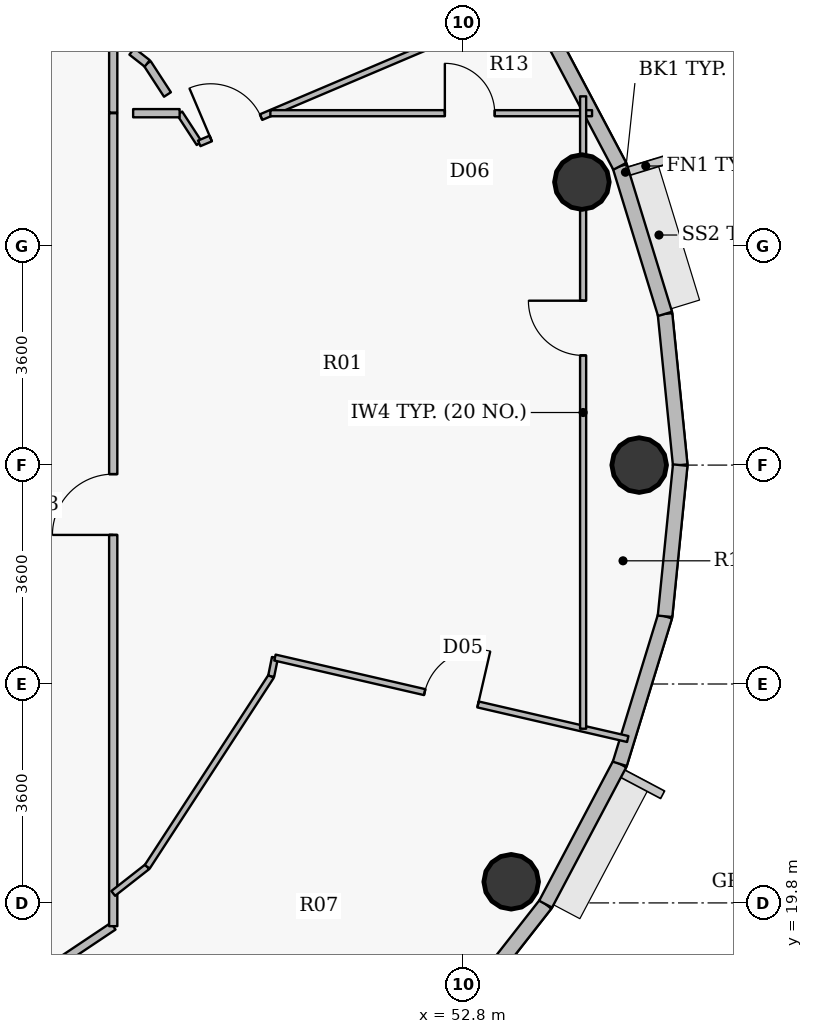
"""IFC4 building model, lengths in metres.
Left out: names, types, materials, properties, quantities, classifications, styles, units other than length and angle.
Written with IfcOpenShell. Run it as: python <this file> out.ifc"""

import sys

from ifc_helpers import new_model, si_unit, direction, frame, frame_2d, origin, origin_2d, place, context, subcontext, project, spatial, rectangle, hollow_circle, extrude, source, transform, mapped, element, fill, save


model = new_model("IFC4")
c1 = context("Model", 3, precision=1e-05, world=origin(), true_north=direction((0.0, 1.0)))
c2 = subcontext(c1, "Body", "Model", "MODEL_VIEW")
j1 = project(units=[si_unit("LENGTHUNIT", "METRE"), si_unit("PLANEANGLEUNIT", "RADIAN")], contexts=[c1])
p1 = place(None, origin())
s1 = spatial("IfcSite", under=j1, at=p1, CompositionType="ELEMENT")
p2 = place(p1, origin())
s2 = spatial("IfcBuilding", under=s1, at=p2, CompositionType="ELEMENT")
p3 = place(p2, frame((0.0, 0.0, 339.2)))
s3 = spatial("IfcBuildingStorey", under=s2, at=p3, CompositionType="ELEMENT", Elevation=339.2)
for number, where, z_axis, x_axis in (
    (1, (55.7, 27.0, 0.0), (0.0, 0.0, 1.0), (1.0, 0.0, 0.0)),
    (2, (54.758, 31.655, 0.0), (0.0, 0.0, 1.0), (1.0, 0.0, 0.0)),
    (3, (53.595, 20.147, 0.0), (0.0, 0.0, 1.0), (1.0, 0.0, 0.0)),
):
    element("IfcColumn", number, at=place(p3, frame(where, z_axis=z_axis, x_axis=x_axis)), inside=s3, PredefinedType="COLUMN", context=c2, shape_type="SweptSolid", body=[
        extrude(hollow_circle(Radius=0.45, WallThickness=0.028, at=origin_2d()), origin(), (0.0, 0.0, 1.0), 3.8),
    ])
p4 = place(p3, frame((56.125, 29.487, 0.0), z_axis=(0.0, 0.0, 1.0), x_axis=(0.100025963401, -0.994984827344, 0.0)))
e4 = element("IfcWall", 4, at=p4, inside=s3, PredefinedType="SOLIDWALL", context=c2, shape_type="SweptSolid", body=[
    extrude(rectangle(XDim=2.499, YDim=0.24, at=frame_2d((1.25, 0.0))), origin(), (0.0, 0.0, 1.0), 3.55),
])
p5 = place(p3, frame((55.381, 31.913, 0.0), z_axis=(0.0, 0.0, 1.0), x_axis=(0.293105547213, -0.956080089842, 0.0)))
e5 = element("IfcWall", 5, at=p5, inside=s3, PredefinedType="SOLIDWALL", context=c2, shape_type="SweptSolid", body=[
    extrude(rectangle(XDim=2.538, YDim=0.24, at=frame_2d((1.269, 0.0))), origin(), (0.0, 0.0, 1.0), 2.035),
])
p6 = place(p3, frame((54.161, 34.221, 0.0), z_axis=(0.0, 0.0, 1.0), x_axis=(0.467487999989, -0.883999417345, 0.0)))
e6 = element("IfcWall", 6, at=p6, inside=s3, PredefinedType="SOLIDWALL", context=c2, shape_type="SweptSolid", body=[
    extrude(rectangle(XDim=2.61, YDim=0.24, at=frame_2d((1.305, 0.0))), origin(), (0.0, 0.0, 1.0), 2.035),
])
p7 = place(p3, frame((54.161, 19.779, 0.0), z_axis=(0.0, 0.0, 1.0), x_axis=(-0.616286367698, -0.78752213492, 0.0)))
e7 = element("IfcWall", 7, at=p7, inside=s3, PredefinedType="SOLIDWALL", context=c2, shape_type="SweptSolid", body=[
    extrude(rectangle(XDim=2.706, YDim=0.24, at=frame_2d((1.353, 0.0))), origin(), (0.0, 0.0, 1.0), 2.035),
])
p8 = place(p3, frame((55.381, 22.087, 0.0), z_axis=(0.0, 0.0, 1.0), x_axis=(-0.467487999989, -0.883999417345, 0.0)))
e8 = element("IfcWall", 8, at=p8, inside=s3, PredefinedType="SOLIDWALL", context=c2, shape_type="SweptSolid", body=[
    extrude(rectangle(XDim=2.61, YDim=0.24, at=frame_2d((1.305, 0.0))), origin(), (0.0, 0.0, 1.0), 2.035),
])
p9 = place(p3, frame((56.125, 24.513, 0.0), z_axis=(0.0, 0.0, 1.0), x_axis=(-0.293105547213, -0.956080089842, 0.0)))
e9 = element("IfcWall", 9, at=p9, inside=s3, PredefinedType="SOLIDWALL", context=c2, shape_type="SweptSolid", body=[
    extrude(rectangle(XDim=2.538, YDim=0.24, at=frame_2d((1.269, 0.0))), origin(), (0.0, 0.0, 1.0), 3.55),
])
p10 = place(p3, frame((56.375, 27.0, 0.0), z_axis=(0.0, 0.0, 1.0), x_axis=(-0.100025963401, -0.994984827344, 0.0)))
e10 = element("IfcWall", 10, at=p10, inside=s3, PredefinedType="SOLIDWALL", context=c2, shape_type="SweptSolid", body=[
    extrude(rectangle(XDim=2.499, YDim=0.24, at=frame_2d((1.25, 0.0))), origin(), (0.0, 0.0, 1.0), 3.55),
])
p11 = place(p3, frame((45.541, 18.408, 0.0), z_axis=(0.0, 0.0, 1.0), x_axis=(0.831180227396, 0.556003084151, 0.0)))
e11 = element("IfcWall", 11, at=p11, inside=s3, PredefinedType="PARTITIONING", context=c2, shape_type="SweptSolid", body=[
    extrude(rectangle(XDim=1.815, YDim=0.135, at=frame_2d((0.908, 0.0))), origin(), (0.0, 0.0, 1.0), 3.085),
])
p12 = place(p3, frame((47.05, 19.417, 0.0), z_axis=(0.0, 0.0, 1.0), x_axis=(0.0, 1.0, 0.0)))
e12 = element("IfcWall", 12, at=p12, inside=s3, PredefinedType="PARTITIONING", context=c2, shape_type="SweptSolid", body=[
    extrude(rectangle(XDim=13.37, YDim=0.135, at=frame_2d((6.685, 0.0))), origin(), (0.0, 0.0, 1.0), 2.25),
])
p13 = place(p12, frame((6.434, 0.0, 0.0)))
e13 = element("IfcOpeningElement", 13, at=p13, cuts=e12, PredefinedType="OPENING", context=c2, shape_type="SweptSolid", body=[
    extrude(rectangle(XDim=1.0, YDim=2.15, at=origin_2d()), frame((0.5, 0.078, 1.075), z_axis=(0.0, -1.0, 0.0), x_axis=(1.0, 0.0, 0.0)), (0.0, 0.0, 1.0), 0.155),
])
p14 = place(p3, frame((47.05, 19.956, 0.0), z_axis=(0.0, 0.0, 1.0), x_axis=(0.787164110493, 0.616743595956, 0.0)))
e14 = element("IfcWall", 14, at=p14, inside=s3, PredefinedType="PARTITIONING", context=c2, shape_type="SweptSolid", body=[
    extrude(rectangle(XDim=0.71, YDim=0.1, at=frame_2d((0.355, 0.0))), origin(), (0.0, 0.0, 1.0), 2.25),
])
p15 = place(p3, frame((47.609, 20.394, 0.0), z_axis=(0.0, 0.0, 1.0), x_axis=(0.545364838352, 0.838198778983, 0.0)))
e15 = element("IfcWall", 15, at=p15, inside=s3, PredefinedType="PARTITIONING", context=c2, shape_type="SweptSolid", body=[
    extrude(rectangle(XDim=3.738, YDim=0.1, at=frame_2d((1.869, 0.0))), origin(), (0.0, 0.0, 1.0), 2.25),
])
p16 = place(p3, frame((48.142, 32.787, 0.0), z_axis=(0.0, 0.0, 1.0), x_axis=(0.545336289771, -0.838217353112, 0.0)))
e16 = element("IfcWall", 16, at=p16, inside=s3, PredefinedType="PARTITIONING", context=c2, shape_type="SweptSolid", body=[
    extrude(rectangle(XDim=0.592, YDim=0.1, at=frame_2d((0.296, 0.0))), origin(), (0.0, 0.0, 1.0), 3.55),
])
p17 = place(p3, frame((48.465, 32.291, 0.0), z_axis=(0.0, 0.0, 1.0), x_axis=(0.920507145492, 0.390725728739, 0.0)))
e17 = element("IfcWall", 17, at=p17, inside=s3, PredefinedType="PARTITIONING", context=c2, shape_type="SweptSolid", body=[
    extrude(rectangle(XDim=5.882, YDim=0.1, at=frame_2d((2.941, 0.0))), origin(), (0.0, 0.0, 1.0), 3.035),
])
p18 = place(p17, frame((0.205, 0.0, 0.0)))
e18 = element("IfcOpeningElement", 18, at=p18, cuts=e17, PredefinedType="OPENING", context=c2, shape_type="SweptSolid", body=[
    extrude(rectangle(XDim=0.9, YDim=2.1, at=origin_2d()), frame((0.45, 0.06, 1.05), z_axis=(0.0, -1.0, 0.0), x_axis=(1.0, 0.0, 0.0)), (0.0, 0.0, 1.0), 0.12),
])
p19 = place(p3, frame((49.634, 32.787, 0.0), z_axis=(0.0, 0.0, 1.0), x_axis=(1.0, 0.0, 0.0)))
e19 = element("IfcWall", 19, at=p19, inside=s3, PredefinedType="PARTITIONING", context=c2, shape_type="SweptSolid", body=[
    extrude(rectangle(XDim=5.291, YDim=0.1, at=frame_2d((2.645, 0.0))), origin(), (0.0, 0.0, 1.0), 3.035),
])
p20 = place(p19, frame((2.87, 0.0, 0.0)))
e20 = element("IfcOpeningElement", 20, at=p20, cuts=e19, PredefinedType="OPENING", context=c2, shape_type="SweptSolid", body=[
    extrude(rectangle(XDim=0.82, YDim=2.1, at=origin_2d()), frame((0.41, 0.06, 1.05), z_axis=(0.0, -1.0, 0.0), x_axis=(1.0, 0.0, 0.0)), (0.0, 0.0, 1.0), 0.12),
])
p21 = place(p3, frame((49.648, 23.527, 0.0), z_axis=(0.0, 0.0, 1.0), x_axis=(0.198359507495, 0.980129331153, 0.0)))
e21 = element("IfcWall", 21, at=p21, inside=s3, PredefinedType="PARTITIONING", context=c2, shape_type="SweptSolid", body=[
    extrude(rectangle(XDim=0.314, YDim=0.1, at=frame_2d((0.157, 0.0))), origin(), (0.0, 0.0, 1.0), 3.55),
])
p22 = place(p3, frame((49.71, 23.835, 0.0), z_axis=(0.0, 0.0, 1.0), x_axis=(0.974373225384, -0.224937363847, 0.0)))
e22 = element("IfcWall", 22, at=p22, inside=s3, PredefinedType="PARTITIONING", context=c2, shape_type="SweptSolid", body=[
    extrude(rectangle(XDim=5.954, YDim=0.1, at=frame_2d((2.977, 0.0))), origin(), (0.0, 0.0, 1.0), 3.035),
])
p23 = place(p22, frame((2.527, 0.0, 0.0)))
e23 = element("IfcOpeningElement", 23, at=p23, cuts=e22, PredefinedType="OPENING", context=c2, shape_type="SweptSolid", body=[
    extrude(rectangle(XDim=0.9, YDim=2.1, at=origin_2d()), frame((0.45, 0.06, 1.05), z_axis=(0.0, -1.0, 0.0), x_axis=(1.0, 0.0, 0.0)), (0.0, 0.0, 1.0), 0.12),
])
p24 = place(p3, frame((54.778, 22.665, 0.0), z_axis=(0.0, 0.0, 1.0), x_axis=(0.0, 1.0, 0.0)))
e24 = element("IfcWall", 24, at=p24, inside=s3, PredefinedType="PARTITIONING", context=c2, shape_type="SweptSolid", body=[
    extrude(rectangle(XDim=10.4, YDim=0.1, at=frame_2d((5.2, 0.0))), origin(), (0.0, 0.0, 1.0), 2.25),
])
p25 = place(p24, frame((6.139, 0.0, 0.0)))
e25 = element("IfcOpeningElement", 25, at=p25, cuts=e24, PredefinedType="OPENING", context=c2, shape_type="SweptSolid", body=[
    extrude(rectangle(XDim=0.9, YDim=2.1, at=origin_2d()), frame((0.45, 0.06, 1.05), z_axis=(0.0, -1.0, 0.0), x_axis=(1.0, 0.0, 0.0)), (0.0, 0.0, 1.0), 0.12),
])
p26 = place(p3, frame((47.05, 34.034, 0.0), z_axis=(0.0, 0.0, 1.0), x_axis=(0.0, -1.0, 0.0)))
e26 = element("IfcWall", 26, at=p26, inside=s3, PredefinedType="PARTITIONING", context=c2, shape_type="SweptSolid", body=[
    extrude(rectangle(XDim=1.237, YDim=0.135, at=frame_2d((0.618, 0.0))), origin(), (0.0, 0.0, 1.0), 3.55),
])
p27 = place(p3, frame((47.377, 32.787, 0.0), z_axis=(0.0, 0.0, 1.0), x_axis=(1.0, 0.0, 0.0)))
e27 = element("IfcWall", 27, at=p27, inside=s3, PredefinedType="PARTITIONING", context=c2, shape_type="SweptSolid", body=[
    extrude(rectangle(XDim=0.765, YDim=0.135, at=frame_2d((0.382, 0.0))), origin(), (0.0, 0.0, 1.0), 3.55),
])
p28 = place(p3, frame((47.942, 33.094, 0.0), z_axis=(0.0, 0.0, 1.0), x_axis=(-0.545522826825, 0.838095964322, 0.0)))
e28 = element("IfcWall", 28, at=p28, inside=s3, PredefinedType="PARTITIONING", context=c2, shape_type="SweptSolid", body=[
    extrude(rectangle(XDim=0.61, YDim=0.135, at=frame_2d((0.305, 0.0))), origin(), (0.0, 0.0, 1.0), 3.55),
])
p29 = place(p3, frame((47.609, 33.606, 0.0), z_axis=(0.0, 0.0, 1.0), x_axis=(-0.787376183758, 0.616472826043, 0.0)))
e29 = element("IfcWall", 29, at=p29, inside=s3, PredefinedType="PARTITIONING", context=c2, shape_type="SweptSolid", body=[
    extrude(rectangle(XDim=0.32, YDim=0.135, at=frame_2d((0.16, 0.0))), origin(), (0.0, 0.0, 1.0), 3.55),
])
m1 = source(origin(), c2, "Body", "SweptSolid", [
    extrude(rectangle(XDim=1.0, YDim=2.15, at=origin_2d()), frame((0.5, 0.025, 1.075), z_axis=(0.0, -1.0, 0.0), x_axis=(1.0, 0.0, 0.0)), (0.0, 0.0, 1.0), 0.05),
])
p30 = place(p13, origin())
e30 = element("IfcDoor", 30, at=p30, inside=s3, OperationType="SINGLE_SWING_LEFT", PredefinedType="DOOR", context=c2, shape_type="MappedRepresentation", body=[
    mapped(m1, transform((0.0, 0.0, 0.0), x_axis=(1.0, 0.0, 0.0), y_axis=(0.0, 1.0, 0.0), z_axis=(0.0, 0.0, 1.0), scale=1.0)),
])
fill(e13, e30)
m2 = source(origin(), c2, "Body", "SweptSolid", [
    extrude(rectangle(XDim=0.9, YDim=2.1, at=origin_2d()), frame((0.45, 0.025, 1.05), z_axis=(0.0, -1.0, 0.0), x_axis=(1.0, 0.0, 0.0)), (0.0, 0.0, 1.0), 0.05),
])
p31 = place(p23, origin())
e31 = element("IfcDoor", 31, at=p31, inside=s3, OperationType="SINGLE_SWING_RIGHT", PredefinedType="DOOR", context=c2, shape_type="MappedRepresentation", body=[
    mapped(m2, transform((0.0, 0.0, 0.0), x_axis=(1.0, 0.0, 0.0), y_axis=(0.0, 1.0, 0.0), z_axis=(0.0, 0.0, 1.0), scale=1.0)),
])
fill(e23, e31)
p32 = place(p18, origin())
e32 = element("IfcDoor", 32, at=p32, inside=s3, OperationType="SINGLE_SWING_LEFT", PredefinedType="DOOR", context=c2, shape_type="MappedRepresentation", body=[
    mapped(m2, transform((0.0, 0.0, 0.0), x_axis=(1.0, 0.0, 0.0), y_axis=(0.0, 1.0, 0.0), z_axis=(0.0, 0.0, 1.0), scale=1.0)),
])
fill(e18, e32)
m3 = source(origin(), c2, "Body", "SweptSolid", [
    extrude(rectangle(XDim=0.82, YDim=2.1, at=origin_2d()), frame((0.41, 0.025, 1.05), z_axis=(0.0, -1.0, 0.0), x_axis=(1.0, 0.0, 0.0)), (0.0, 0.0, 1.0), 0.05),
])
p33 = place(p20, origin())
e33 = element("IfcDoor", 33, at=p33, inside=s3, OperationType="SINGLE_SWING_LEFT", PredefinedType="DOOR", context=c2, shape_type="MappedRepresentation", body=[
    mapped(m3, transform((0.0, 0.0, 0.0), x_axis=(1.0, 0.0, 0.0), y_axis=(0.0, 1.0, 0.0), z_axis=(0.0, 0.0, 1.0), scale=1.0)),
])
fill(e20, e33)
p34 = place(p25, origin())
e34 = element("IfcDoor", 34, at=p34, inside=s3, OperationType="SINGLE_SWING_RIGHT", PredefinedType="DOOR", context=c2, shape_type="MappedRepresentation", body=[
    mapped(m2, transform((0.0, 0.0, 0.0), x_axis=(1.0, 0.0, 0.0), y_axis=(0.0, 1.0, 0.0), z_axis=(0.0, 0.0, 1.0), scale=1.0)),
])
fill(e25, e34)
save(model, sys.argv[1])
